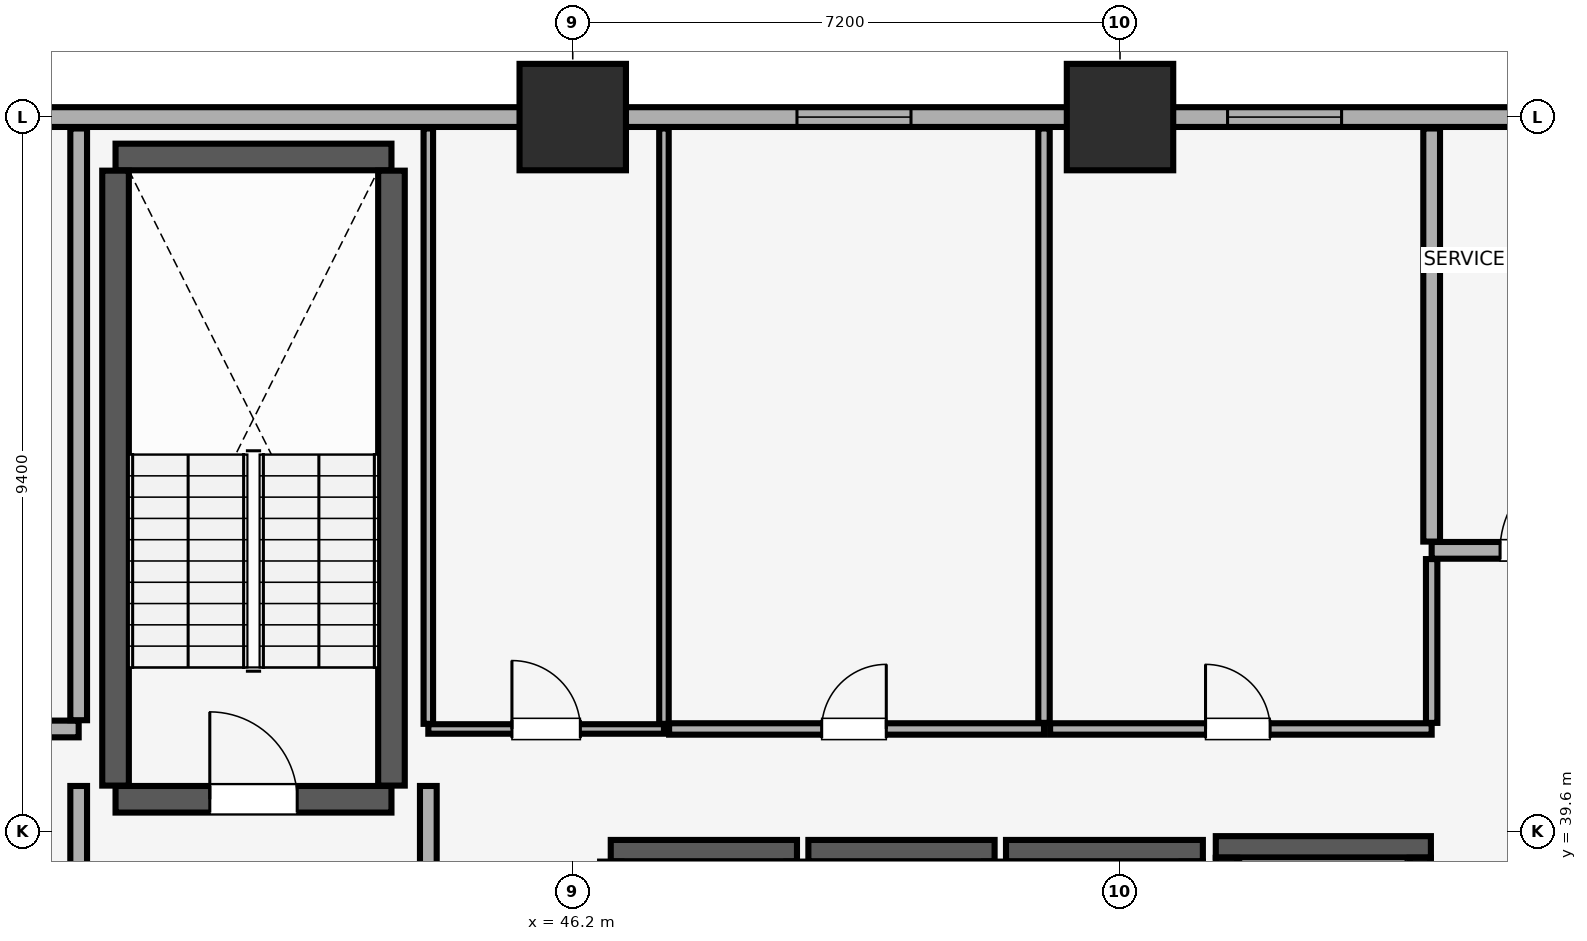
"""IFC4 building model, lengths in metres.
Left out: names, types, materials, properties, quantities, classifications, styles, units other than length and angle.
Written with IfcOpenShell. Run it as: python <this file> out.ifc"""

import sys

from ifc_helpers import new_model, si_unit, direction, frame, frame_2d, origin, origin_2d, place, context, subcontext, project, spatial, rectangle, extrude, element, fill, save


model = new_model("IFC4")
c1 = context("Model", 3, precision=1e-05, world=origin(), true_north=direction((0.0, 1.0)))
c2 = subcontext(c1, "Body", "Model", "MODEL_VIEW")
j1 = project(units=[si_unit("LENGTHUNIT", "METRE"), si_unit("PLANEANGLEUNIT", "RADIAN")], contexts=[c1])
p1 = place(None, origin())
s1 = spatial("IfcSite", under=j1, at=p1, CompositionType="ELEMENT")
p2 = place(p1, origin())
s2 = spatial("IfcBuilding", under=s1, at=p2, CompositionType="ELEMENT")
p3 = place(p2, frame((0.0, 0.0, 68.9)))
s3 = spatial("IfcBuildingStorey", under=s2, at=p3, CompositionType="ELEMENT", Elevation=68.9)
for number, where, z_axis, x_axis in (
    (1, (46.2, 49.0, 0.0), (0.0, 0.0, 1.0), (1.0, 0.0, 0.0)),
    (2, (53.4, 49.0, 0.0), (0.0, 0.0, 1.0), (1.0, 0.0, 0.0)),
):
    element("IfcColumn", number, at=place(p3, frame(where, z_axis=z_axis, x_axis=x_axis)), inside=s3, PredefinedType="COLUMN", context=c2, shape_type="SweptSolid", body=[
        extrude(rectangle(XDim=1.4, YDim=1.4, at=origin_2d()), origin(), (0.0, 0.0, 1.0), 3.51),
    ])
p4 = place(p3, frame((79.8, 49.0, 0.0), z_axis=(0.0, 0.0, 1.0), x_axis=(-1.0, 0.0, 0.0)))
e3 = element("IfcWall", 3, at=p4, inside=s3, PredefinedType="SOLIDWALL", context=c2, shape_type="SweptSolid", body=[
    extrude(rectangle(XDim=75.6, YDim=0.26, at=frame_2d((37.8, 0.0))), origin(), (0.0, 0.0, 1.0), 2.56),
])
p5 = place(p4, frame((72.565, 0.0, 0.85)))
e4 = element("IfcOpeningElement", 4, at=p5, cuts=e3, PredefinedType="OPENING", context=c2, shape_type="SweptSolid", body=[
    extrude(rectangle(XDim=1.5, YDim=1.4, at=frame_2d((0.75, 0.7))), frame((0.0, 0.14, 0.0), z_axis=(0.0, -1.0, 0.0), x_axis=(1.0, 0.0, 0.0)), (0.0, 0.0, 1.0), 0.28),
])
p6 = place(p4, frame((67.45, 0.0, 0.85)))
e5 = element("IfcOpeningElement", 5, at=p6, cuts=e3, PredefinedType="OPENING", context=c2, shape_type="SweptSolid", body=[
    extrude(rectangle(XDim=1.5, YDim=1.4, at=frame_2d((0.75, 0.7))), frame((0.0, 0.14, 0.0), z_axis=(0.0, -1.0, 0.0), x_axis=(1.0, 0.0, 0.0)), (0.0, 0.0, 1.0), 0.28),
])
p7 = place(p4, frame((6.65, 0.0, 0.85)))
e6 = element("IfcOpeningElement", 6, at=p7, cuts=e3, PredefinedType="OPENING", context=c2, shape_type="SweptSolid", body=[
    extrude(rectangle(XDim=1.5, YDim=1.4, at=frame_2d((0.75, 0.7))), frame((0.0, 0.14, 0.0), z_axis=(0.0, -1.0, 0.0), x_axis=(1.0, 0.0, 0.0)), (0.0, 0.0, 1.0), 0.28),
])
p8 = place(p4, frame((1.535, 0.0, 0.85)))
e7 = element("IfcOpeningElement", 7, at=p8, cuts=e3, PredefinedType="OPENING", context=c2, shape_type="SweptSolid", body=[
    extrude(rectangle(XDim=1.5, YDim=1.4, at=frame_2d((0.75, 0.7))), frame((0.0, 0.14, 0.0), z_axis=(0.0, -1.0, 0.0), x_axis=(1.0, 0.0, 0.0)), (0.0, 0.0, 1.0), 0.28),
])
p9 = place(p4, frame((51.365, 0.0, 0.9)))
e8 = element("IfcOpeningElement", 8, at=p9, cuts=e3, PredefinedType="OPENING", context=c2, shape_type="SweptSolid", body=[
    extrude(rectangle(XDim=1.5, YDim=1.4, at=frame_2d((0.75, 0.7))), frame((0.0, 0.14, 0.0), z_axis=(0.0, -1.0, 0.0), x_axis=(1.0, 0.0, 0.0)), (0.0, 0.0, 1.0), 0.28),
])
p10 = place(p4, frame((46.0, 0.0, 0.9)))
e9 = element("IfcOpeningElement", 9, at=p10, cuts=e3, PredefinedType="OPENING", context=c2, shape_type="SweptSolid", body=[
    extrude(rectangle(XDim=1.5, YDim=1.4, at=frame_2d((0.75, 0.7))), frame((0.0, 0.14, 0.0), z_axis=(0.0, -1.0, 0.0), x_axis=(1.0, 0.0, 0.0)), (0.0, 0.0, 1.0), 0.28),
])
p11 = place(p4, frame((29.15, 0.0, 0.9)))
e10 = element("IfcOpeningElement", 10, at=p11, cuts=e3, PredefinedType="OPENING", context=c2, shape_type="SweptSolid", body=[
    extrude(rectangle(XDim=1.5, YDim=1.4, at=frame_2d((0.75, 0.7))), frame((0.0, 0.14, 0.0), z_axis=(0.0, -1.0, 0.0), x_axis=(1.0, 0.0, 0.0)), (0.0, 0.0, 1.0), 0.28),
])
p12 = place(p4, frame((23.485, 0.0, 0.9)))
e11 = element("IfcOpeningElement", 11, at=p12, cuts=e3, PredefinedType="OPENING", context=c2, shape_type="SweptSolid", body=[
    extrude(rectangle(XDim=1.5, YDim=1.4, at=frame_2d((0.75, 0.7))), frame((0.0, 0.14, 0.0), z_axis=(0.0, -1.0, 0.0), x_axis=(1.0, 0.0, 0.0)), (0.0, 0.0, 1.0), 0.28),
])
p13 = place(p3, frame((40.185, 40.025, 0.0), z_axis=(0.0, 0.0, 1.0), x_axis=(1.0, 0.0, 0.0)))
e12 = element("IfcWall", 12, at=p13, inside=s3, PredefinedType="SHEAR", context=c2, shape_type="SweptSolid", body=[
    extrude(rectangle(XDim=3.63, YDim=0.35, at=frame_2d((1.815, 0.0))), origin(), (0.0, 0.0, 1.0), 3.51),
])
p14 = place(p13, frame((1.24, 0.0, 0.0)))
e13 = element("IfcOpeningElement", 13, at=p14, cuts=e12, PredefinedType="OPENING", context=c2, shape_type="SweptSolid", body=[
    extrude(rectangle(XDim=1.15, YDim=2.15, at=frame_2d((0.575, 1.075))), frame((0.0, 0.185, 0.0), z_axis=(0.0, -1.0, 0.0), x_axis=(1.0, 0.0, 0.0)), (0.0, 0.0, 1.0), 0.37),
])
p15 = place(p3, frame((40.185, 48.475, 0.0), z_axis=(0.0, 0.0, 1.0), x_axis=(1.0, 0.0, 0.0)))
e14 = element("IfcWall", 14, at=p15, inside=s3, PredefinedType="SHEAR", context=c2, shape_type="SweptSolid", body=[
    extrude(rectangle(XDim=3.63, YDim=0.35, at=frame_2d((1.815, 0.0))), origin(), (0.0, 0.0, 1.0), 3.51),
])
for number, where, z_axis, x_axis in (
    (15, (40.185, 40.205, 0.0), (0.0, 0.0, 1.0), (0.0, 1.0, 0.0)),
    (16, (43.815, 40.205, 0.0), (0.0, 0.0, 1.0), (0.0, 1.0, 0.0)),
):
    element("IfcWall", number, at=place(p3, frame(where, z_axis=z_axis, x_axis=x_axis)), inside=s3, PredefinedType="SHEAR", context=c2, shape_type="SweptSolid", body=[
        extrude(rectangle(XDim=8.09, YDim=0.35, at=frame_2d((4.045, 0.0))), origin(), (0.0, 0.0, 1.0), 3.51),
    ])
p16 = place(p3, frame((46.7, 39.35, 0.0), z_axis=(0.0, 0.0, 1.0), x_axis=(1.0, 0.0, 0.0)))
e17 = element("IfcWall", 17, at=p16, inside=s3, PredefinedType="SHEAR", context=c2, shape_type="SweptSolid", body=[
    extrude(rectangle(XDim=2.45, YDim=0.28, at=frame_2d((1.225, 0.0))), origin(), (0.0, 0.0, 1.0), 3.51),
])
for number, where, z_axis, x_axis in (
    (18, (46.7, 37.145, 0.0), (0.0, 0.0, 1.0), (0.0, 1.0, 0.0)),
    (19, (49.15, 37.145, 0.0), (0.0, 0.0, 1.0), (0.0, 1.0, 0.0)),
):
    element("IfcWall", number, at=place(p3, frame(where, z_axis=z_axis, x_axis=x_axis)), inside=s3, PredefinedType="SHEAR", context=c2, shape_type="SweptSolid", body=[
        extrude(rectangle(XDim=2.06, YDim=0.28, at=frame_2d((1.03, 0.0))), origin(), (0.0, 0.0, 1.0), 3.51),
    ])
p17 = place(p3, frame((49.3, 39.35, 0.0), z_axis=(0.0, 0.0, 1.0), x_axis=(1.0, 0.0, 0.0)))
e20 = element("IfcWall", 20, at=p17, inside=s3, PredefinedType="SHEAR", context=c2, shape_type="SweptSolid", body=[
    extrude(rectangle(XDim=2.45, YDim=0.28, at=frame_2d((1.225, 0.0))), origin(), (0.0, 0.0, 1.0), 3.51),
])
p18 = place(p3, frame((51.75, 37.145, 0.0), z_axis=(0.0, 0.0, 1.0), x_axis=(0.0, 1.0, 0.0)))
e21 = element("IfcWall", 21, at=p18, inside=s3, PredefinedType="SHEAR", context=c2, shape_type="SweptSolid", body=[
    extrude(rectangle(XDim=2.06, YDim=0.28, at=frame_2d((1.03, 0.0))), origin(), (0.0, 0.0, 1.0), 3.51),
])
p19 = place(p3, frame((51.9, 39.35, 0.0), z_axis=(0.0, 0.0, 1.0), x_axis=(1.0, 0.0, 0.0)))
e22 = element("IfcWall", 22, at=p19, inside=s3, PredefinedType="SHEAR", context=c2, shape_type="SweptSolid", body=[
    extrude(rectangle(XDim=2.59, YDim=0.28, at=frame_2d((1.295, 0.0))), origin(), (0.0, 0.0, 1.0), 3.51),
])
p20 = place(p3, frame((54.35, 37.145, 0.0), z_axis=(0.0, 0.0, 1.0), x_axis=(0.0, 1.0, 0.0)))
e23 = element("IfcWall", 23, at=p20, inside=s3, PredefinedType="SHEAR", context=c2, shape_type="SweptSolid", body=[
    extrude(rectangle(XDim=2.06, YDim=0.28, at=frame_2d((1.03, 0.0))), origin(), (0.0, 0.0, 1.0), 3.51),
])
p21 = place(p3, frame((54.66, 39.4, 0.0), z_axis=(0.0, 0.0, 1.0), x_axis=(1.0, 0.0, 0.0)))
e24 = element("IfcWall", 24, at=p21, inside=s3, PredefinedType="SHEAR", context=c2, shape_type="SweptSolid", body=[
    extrude(rectangle(XDim=2.83, YDim=0.28, at=frame_2d((1.415, 0.0))), origin(), (0.0, 0.0, 1.0), 3.51),
])
for number, where, z_axis, x_axis in (
    (25, (54.8, 37.145, 0.0), (0.0, 0.0, 1.0), (0.0, 1.0, 0.0)),
    (26, (57.35, 37.145, 0.0), (0.0, 0.0, 1.0), (0.0, 1.0, 0.0)),
):
    element("IfcWall", number, at=place(p3, frame(where, z_axis=z_axis, x_axis=x_axis)), inside=s3, PredefinedType="SHEAR", context=c2, shape_type="SweptSolid", body=[
        extrude(rectangle(XDim=2.11, YDim=0.28, at=frame_2d((1.055, 0.0))), origin(), (0.0, 0.0, 1.0), 3.51),
    ])
for number, where, z_axis, x_axis in (
    (27, (39.7, 34.415, 0.0), (0.0, 0.0, 1.0), (0.0, 1.0, 0.0)),
    (28, (44.3, 34.415, 0.0), (0.0, 0.0, 1.0), (0.0, 1.0, 0.0)),
):
    element("IfcWall", number, at=place(p3, frame(where, z_axis=z_axis, x_axis=x_axis)), inside=s3, PredefinedType="PARTITIONING", context=c2, shape_type="SweptSolid", body=[
        extrude(rectangle(XDim=5.785, YDim=0.22, at=frame_2d((2.893, 0.0))), origin(), (0.0, 0.0, 1.0), 3.51),
    ])
p22 = place(p3, frame((57.5, 43.3, 0.0), z_axis=(0.0, 0.0, 1.0), x_axis=(1.0, 0.0, 0.0)))
e29 = element("IfcWall", 29, at=p22, inside=s3, PredefinedType="PARTITIONING", context=c2, shape_type="SweptSolid", body=[
    extrude(rectangle(XDim=3.04, YDim=0.22, at=frame_2d((1.52, 0.0))), origin(), (0.0, 0.0, 1.0), 3.51),
])
p23 = place(p22, frame((0.9, 0.0, 0.0)))
e30 = element("IfcOpeningElement", 30, at=p23, cuts=e29, PredefinedType="OPENING", context=c2, shape_type="SweptSolid", body=[
    extrude(rectangle(XDim=1.2, YDim=2.15, at=frame_2d((0.6, 1.075))), frame((0.0, 0.12, 0.0), z_axis=(0.0, -1.0, 0.0), x_axis=(1.0, 0.0, 0.0)), (0.0, 0.0, 1.0), 0.24),
])
p24 = place(p3, frame((57.5, 43.415, 0.0), z_axis=(0.0, 0.0, 1.0), x_axis=(0.0, 1.0, 0.0)))
e31 = element("IfcWall", 31, at=p24, inside=s3, PredefinedType="PARTITIONING", context=c2, shape_type="SweptSolid", body=[
    extrude(rectangle(XDim=5.435, YDim=0.22, at=frame_2d((2.718, 0.0))), origin(), (0.0, 0.0, 1.0), 3.51),
])
p25 = place(p3, frame((35.18, 40.95, 0.0), z_axis=(0.0, 0.0, 1.0), x_axis=(1.0, 0.0, 0.0)))
e32 = element("IfcWall", 32, at=p25, inside=s3, PredefinedType="PARTITIONING", context=c2, shape_type="SweptSolid", body=[
    extrude(rectangle(XDim=4.52, YDim=0.22, at=frame_2d((2.26, 0.0))), origin(), (0.0, 0.0, 1.0), 3.51),
])
p26 = place(p25, frame((0.795, 0.0, 0.0)))
e33 = element("IfcOpeningElement", 33, at=p26, cuts=e32, PredefinedType="OPENING", context=c2, shape_type="SweptSolid", body=[
    extrude(rectangle(XDim=0.85, YDim=2.1, at=frame_2d((0.425, 1.05))), frame((0.0, 0.12, 0.0), z_axis=(0.0, -1.0, 0.0), x_axis=(1.0, 0.0, 0.0)), (0.0, 0.0, 1.0), 0.24),
])
p27 = place(p3, frame((39.7, 41.065, 0.0), z_axis=(0.0, 0.0, 1.0), x_axis=(0.0, 1.0, 0.0)))
e34 = element("IfcWall", 34, at=p27, inside=s3, PredefinedType="PARTITIONING", context=c2, shape_type="SweptSolid", body=[
    extrude(rectangle(XDim=7.785, YDim=0.22, at=frame_2d((3.893, 0.0))), origin(), (0.0, 0.0, 1.0), 3.51),
])
p28 = place(p3, frame((44.3, 40.95, 0.0), z_axis=(0.0, 0.0, 1.0), x_axis=(1.0, 0.0, 0.0)))
e35 = element("IfcWall", 35, at=p28, inside=s3, PredefinedType="PARTITIONING", context=c2, shape_type="SweptSolid", body=[
    extrude(rectangle(XDim=3.1, YDim=0.125, at=frame_2d((1.55, 0.0))), origin(), (0.0, 0.0, 1.0), 3.51),
])
p29 = place(p28, frame((1.1, 0.0, 0.0)))
e36 = element("IfcOpeningElement", 36, at=p29, cuts=e35, PredefinedType="OPENING", context=c2, shape_type="SweptSolid", body=[
    extrude(rectangle(XDim=0.9, YDim=2.1, at=frame_2d((0.45, 1.05))), frame((0.0, 0.073, 0.0), z_axis=(0.0, -1.0, 0.0), x_axis=(1.0, 0.0, 0.0)), (0.0, 0.0, 1.0), 0.145),
])
for number, where, z_axis, x_axis in (
    (37, (44.3, 41.018, 0.0), (0.0, 0.0, 1.0), (0.0, 1.0, 0.0)),
    (38, (47.4, 41.018, 0.0), (0.0, 0.0, 1.0), (0.0, 1.0, 0.0)),
):
    element("IfcWall", number, at=place(p3, frame(where, z_axis=z_axis, x_axis=x_axis)), inside=s3, PredefinedType="PARTITIONING", context=c2, shape_type="SweptSolid", body=[
        extrude(rectangle(XDim=7.833, YDim=0.125, at=frame_2d((3.916, 0.0))), origin(), (0.0, 0.0, 1.0), 3.51),
    ])
p30 = place(p3, frame((47.468, 40.95, 0.0), z_axis=(0.0, 0.0, 1.0), x_axis=(1.0, 0.0, 0.0)))
e39 = element("IfcWall", 39, at=p30, inside=s3, PredefinedType="PARTITIONING", context=c2, shape_type="SweptSolid", body=[
    extrude(rectangle(XDim=4.932, YDim=0.15, at=frame_2d((2.466, 0.0))), origin(), (0.0, 0.0, 1.0), 3.51),
])
p31 = place(p30, frame((2.008, 0.0, 0.0)))
e40 = element("IfcOpeningElement", 40, at=p31, cuts=e39, PredefinedType="OPENING", context=c2, shape_type="SweptSolid", body=[
    extrude(rectangle(XDim=0.85, YDim=2.1, at=frame_2d((0.425, 1.05))), frame((0.0, 0.085, 0.0), z_axis=(0.0, -1.0, 0.0), x_axis=(1.0, 0.0, 0.0)), (0.0, 0.0, 1.0), 0.17),
])
p32 = place(p3, frame((52.4, 41.03, 0.0), z_axis=(0.0, 0.0, 1.0), x_axis=(0.0, 1.0, 0.0)))
e41 = element("IfcWall", 41, at=p32, inside=s3, PredefinedType="PARTITIONING", context=c2, shape_type="SweptSolid", body=[
    extrude(rectangle(XDim=7.82, YDim=0.15, at=frame_2d((3.91, 0.0))), origin(), (0.0, 0.0, 1.0), 3.51),
])
p33 = place(p3, frame((52.48, 40.95, 0.0), z_axis=(0.0, 0.0, 1.0), x_axis=(1.0, 0.0, 0.0)))
e42 = element("IfcWall", 42, at=p33, inside=s3, PredefinedType="PARTITIONING", context=c2, shape_type="SweptSolid", body=[
    extrude(rectangle(XDim=5.02, YDim=0.15, at=frame_2d((2.51, 0.0))), origin(), (0.0, 0.0, 1.0), 3.51),
])
p34 = place(p33, frame((2.045, 0.0, 0.0)))
e43 = element("IfcOpeningElement", 43, at=p34, cuts=e42, PredefinedType="OPENING", context=c2, shape_type="SweptSolid", body=[
    extrude(rectangle(XDim=0.85, YDim=2.1, at=frame_2d((0.425, 1.05))), frame((0.0, 0.085, 0.0), z_axis=(0.0, -1.0, 0.0), x_axis=(1.0, 0.0, 0.0)), (0.0, 0.0, 1.0), 0.17),
])
p35 = place(p3, frame((57.5, 41.03, 0.0), z_axis=(0.0, 0.0, 1.0), x_axis=(0.0, 1.0, 0.0)))
e44 = element("IfcWall", 44, at=p35, inside=s3, PredefinedType="PARTITIONING", context=c2, shape_type="SweptSolid", body=[
    extrude(rectangle(XDim=2.155, YDim=0.15, at=frame_2d((1.078, 0.0))), origin(), (0.0, 0.0, 1.0), 3.51),
])
p36 = place(p11, origin())
e45 = element("IfcWindow", 45, at=p36, inside=s3, PartitioningType="SINGLE_PANEL", PredefinedType="WINDOW", context=c2, shape_type="SweptSolid", body=[
    extrude(rectangle(XDim=1.5, YDim=1.4, at=frame_2d((0.75, 0.7))), frame((0.0, 0.03, 0.0), z_axis=(0.0, -1.0, 0.0), x_axis=(1.0, 0.0, 0.0)), (0.0, 0.0, 1.0), 0.06),
])
fill(e10, e45)
p37 = place(p12, origin())
e46 = element("IfcWindow", 46, at=p37, inside=s3, PartitioningType="SINGLE_PANEL", PredefinedType="WINDOW", context=c2, shape_type="SweptSolid", body=[
    extrude(rectangle(XDim=1.5, YDim=1.4, at=frame_2d((0.75, 0.7))), frame((0.0, 0.03, 0.0), z_axis=(0.0, -1.0, 0.0), x_axis=(1.0, 0.0, 0.0)), (0.0, 0.0, 1.0), 0.06),
])
fill(e11, e46)
p38 = place(p14, origin())
e47 = element("IfcDoor", 47, at=p38, inside=s3, OperationType="SINGLE_SWING_LEFT", PredefinedType="DOOR", context=c2, shape_type="SweptSolid", body=[
    extrude(rectangle(XDim=1.15, YDim=2.15, at=frame_2d((0.575, 1.075))), frame((0.0, 0.025, 0.0), z_axis=(0.0, -1.0, 0.0), x_axis=(1.0, 0.0, 0.0)), (0.0, 0.0, 1.0), 0.05),
])
fill(e13, e47)
p39 = place(p23, origin())
e48 = element("IfcDoor", 48, at=p39, inside=s3, OperationType="SINGLE_SWING_RIGHT", PredefinedType="DOOR", context=c2, shape_type="SweptSolid", body=[
    extrude(rectangle(XDim=1.2, YDim=2.15, at=frame_2d((0.6, 1.075))), frame((0.0, 0.025, 0.0), z_axis=(0.0, -1.0, 0.0), x_axis=(1.0, 0.0, 0.0)), (0.0, 0.0, 1.0), 0.05),
])
fill(e30, e48)
p40 = place(p29, origin())
e49 = element("IfcDoor", 49, at=p40, inside=s3, OperationType="SINGLE_SWING_LEFT", PredefinedType="DOOR", context=c2, shape_type="SweptSolid", body=[
    extrude(rectangle(XDim=0.9, YDim=2.1, at=frame_2d((0.45, 1.05))), frame((0.0, 0.025, 0.0), z_axis=(0.0, -1.0, 0.0), x_axis=(1.0, 0.0, 0.0)), (0.0, 0.0, 1.0), 0.05),
])
fill(e36, e49)
p41 = place(p31, origin())
e50 = element("IfcDoor", 50, at=p41, inside=s3, OperationType="SINGLE_SWING_RIGHT", PredefinedType="DOOR", context=c2, shape_type="SweptSolid", body=[
    extrude(rectangle(XDim=0.85, YDim=2.1, at=frame_2d((0.425, 1.05))), frame((0.0, 0.025, 0.0), z_axis=(0.0, -1.0, 0.0), x_axis=(1.0, 0.0, 0.0)), (0.0, 0.0, 1.0), 0.05),
])
fill(e40, e50)
p42 = place(p34, origin())
e51 = element("IfcDoor", 51, at=p42, inside=s3, OperationType="SINGLE_SWING_LEFT", PredefinedType="DOOR", context=c2, shape_type="SweptSolid", body=[
    extrude(rectangle(XDim=0.85, YDim=2.1, at=frame_2d((0.425, 1.05))), frame((0.0, 0.025, 0.0), z_axis=(0.0, -1.0, 0.0), x_axis=(1.0, 0.0, 0.0)), (0.0, 0.0, 1.0), 0.05),
])
fill(e43, e51)
save(model, sys.argv[1])
